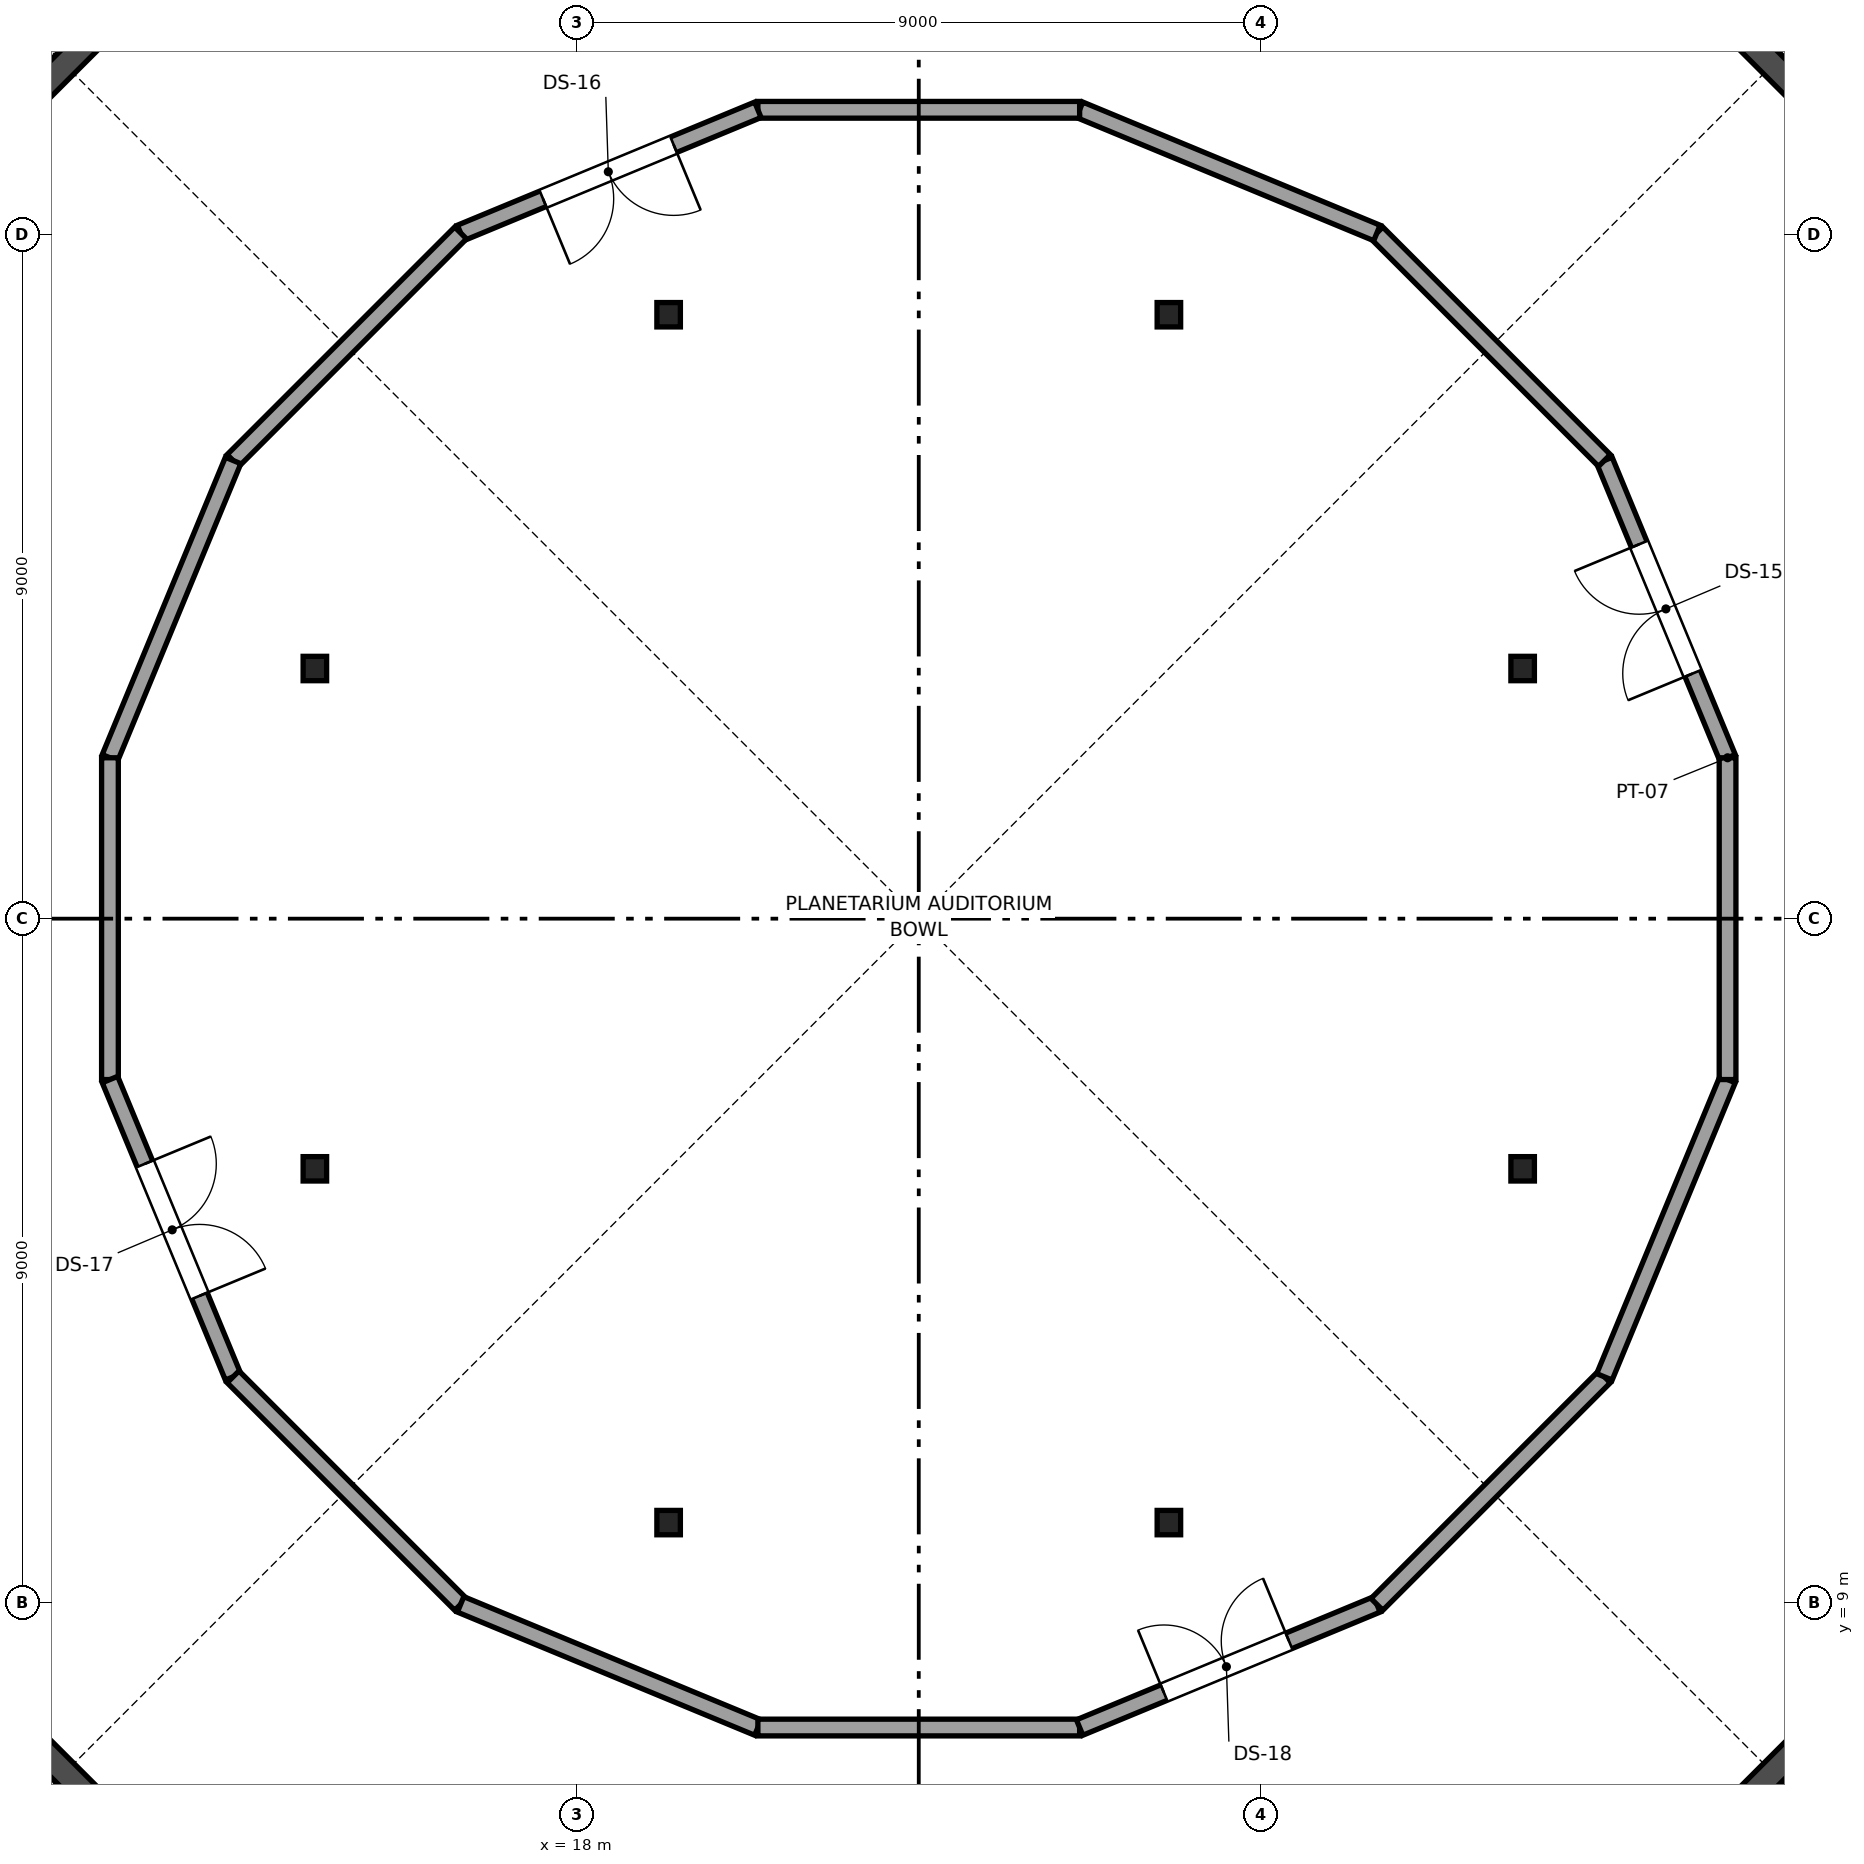
"""IFC4 building model, lengths in metres.
Left out: names, types, materials, properties, quantities, classifications, styles, units other than length and angle.
Written with IfcOpenShell. Run it as: python <this file> out.ifc"""

import sys

from ifc_helpers import new_model, si_unit, direction, frame, frame_2d, origin, origin_2d, place, context, subcontext, project, spatial, rectangle, i_section, extrude, element, fill, save


model = new_model("IFC4")
c1 = context("Model", 3, precision=1e-05, world=origin(), true_north=direction((0.0, 1.0)))
c2 = subcontext(c1, "Body", "Model", "MODEL_VIEW")
j1 = project(units=[si_unit("LENGTHUNIT", "METRE"), si_unit("PLANEANGLEUNIT", "RADIAN")], contexts=[c1])
p1 = place(None, origin())
s1 = spatial("IfcSite", under=j1, at=p1, CompositionType="ELEMENT")
p2 = place(p1, origin())
s2 = spatial("IfcBuilding", under=s1, at=p2, CompositionType="ELEMENT")
p3 = place(p2, origin())
s3 = spatial("IfcBuildingStorey", under=s2, at=p3, CompositionType="ELEMENT", Elevation=0.0)
for number, where, z_axis, x_axis in (
    (1, (30.445, 21.291, -0.24), (0.0, 0.0, 1.0), (1.0, 0.0, 0.0)),
    (2, (25.791, 25.945, -0.24), (0.0, 0.0, 1.0), (1.0, 0.0, 0.0)),
    (3, (19.209, 25.945, -0.24), (0.0, 0.0, 1.0), (1.0, 0.0, 0.0)),
    (4, (14.555, 21.291, -0.24), (0.0, 0.0, 1.0), (1.0, 0.0, 0.0)),
    (5, (14.555, 14.709, -0.24), (0.0, 0.0, 1.0), (1.0, 0.0, 0.0)),
    (6, (19.209, 10.055, -0.24), (0.0, 0.0, 1.0), (1.0, 0.0, 0.0)),
    (7, (25.791, 10.055, -0.24), (0.0, 0.0, 1.0), (1.0, 0.0, 0.0)),
    (8, (30.445, 14.709, -0.24), (0.0, 0.0, 1.0), (1.0, 0.0, 0.0)),
):
    element("IfcColumn", number, at=place(p3, frame(where, z_axis=z_axis, x_axis=x_axis)), inside=s3, PredefinedType="COLUMN", context=c2, shape_type="SweptSolid", body=[
        extrude(i_section(OverallWidth=0.309, OverallDepth=0.321, WebThickness=0.014, FlangeThickness=0.022, FilletRadius=0.017, at=origin_2d()), origin(), (0.0, 0.0, 1.0), 5.64),
    ])
for number, where, z_axis, x_axis in (
    (9, (35.97, 27.0, -0.24), (0.0, 0.0, 1.0), (-0.707, 0.707, 0.0)),
    (10, (13.5, 31.47, -0.24), (0.0, 0.0, 1.0), (-0.707, -0.707, 0.0)),
    (11, (9.03, 9.0, -0.24), (0.0, 0.0, 1.0), (0.707, -0.707, 0.0)),
    (12, (31.5, 4.53, -0.24), (0.0, 0.0, 1.0), (0.707, 0.707, 0.0)),
):
    element("IfcWall", number, at=place(p3, frame(where, z_axis=z_axis, x_axis=x_axis)), inside=s3, PredefinedType="SHEAR", context=c2, shape_type="SweptSolid", body=[
        extrude(rectangle(XDim=6.321, YDim=0.34, at=frame_2d((3.16, 0.0))), origin(), (0.0, 0.0, 1.0), 5.46),
    ])
p4 = place(p3, frame((33.142, 20.117, 0.0), z_axis=(0.0, 0.0, 1.0), x_axis=(-0.382698137168, 0.923873441445, 0.0)))
e13 = element("IfcWall", 13, at=p4, inside=s3, PredefinedType="PARTITIONING", context=c2, shape_type="SweptSolid", body=[
    extrude(rectangle(XDim=4.233, YDim=0.22, at=frame_2d((2.117, 0.0))), origin(), (0.0, 0.0, 1.0), 5.22),
])
p5 = place(p4, frame((1.2, 0.0, 0.0)))
e14 = element("IfcOpeningElement", 14, at=p5, cuts=e13, PredefinedType="OPENING", context=c2, shape_type="SweptSolid", body=[
    extrude(rectangle(XDim=1.84, YDim=2.3, at=frame_2d((0.92, 1.15))), frame((0.0, 0.12, 0.0), z_axis=(0.0, -1.0, 0.0), x_axis=(1.0, 0.0, 0.0)), (0.0, 0.0, 1.0), 0.24),
])
p6 = place(p3, frame((31.521, 24.028, 0.0), z_axis=(0.0, 0.0, 1.0), x_axis=(-0.707106781187, 0.707106781187, 0.0)))
e15 = element("IfcWall", 15, at=p6, inside=s3, PredefinedType="PARTITIONING", context=c2, shape_type="SweptSolid", body=[
    extrude(rectangle(XDim=4.234, YDim=0.22, at=frame_2d((2.117, 0.0))), origin(), (0.0, 0.0, 1.0), 5.22),
])
for number, where, z_axis, x_axis in (
    (16, (28.528, 27.021, 0.0), (0.0, 0.0, 1.0), (-0.924, 0.383, 0.0)),
    (17, (24.617, 28.642, 0.0), (0.0, 0.0, 1.0), (-1.0, 0.0, 0.0)),
):
    element("IfcWall", number, at=place(p3, frame(where, z_axis=z_axis, x_axis=x_axis)), inside=s3, PredefinedType="PARTITIONING", context=c2, shape_type="SweptSolid", body=[
        extrude(rectangle(XDim=4.233, YDim=0.22, at=frame_2d((2.117, 0.0))), origin(), (0.0, 0.0, 1.0), 5.22),
    ])
p7 = place(p3, frame((20.383, 28.642, 0.0), z_axis=(0.0, 0.0, 1.0), x_axis=(-0.923873441445, -0.382698137168, 0.0)))
e18 = element("IfcWall", 18, at=p7, inside=s3, PredefinedType="PARTITIONING", context=c2, shape_type="SweptSolid", body=[
    extrude(rectangle(XDim=4.233, YDim=0.22, at=frame_2d((2.117, 0.0))), origin(), (0.0, 0.0, 1.0), 5.22),
])
p8 = place(p7, frame((1.2, 0.0, 0.0)))
e19 = element("IfcOpeningElement", 19, at=p8, cuts=e18, PredefinedType="OPENING", context=c2, shape_type="SweptSolid", body=[
    extrude(rectangle(XDim=1.86, YDim=2.3, at=frame_2d((0.93, 1.15))), frame((0.0, 0.12, 0.0), z_axis=(0.0, -1.0, 0.0), x_axis=(1.0, 0.0, 0.0)), (0.0, 0.0, 1.0), 0.24),
])
p9 = place(p3, frame((16.472, 27.021, 0.0), z_axis=(0.0, 0.0, 1.0), x_axis=(-0.707106781187, -0.707106781187, 0.0)))
e20 = element("IfcWall", 20, at=p9, inside=s3, PredefinedType="PARTITIONING", context=c2, shape_type="SweptSolid", body=[
    extrude(rectangle(XDim=4.234, YDim=0.22, at=frame_2d((2.117, 0.0))), origin(), (0.0, 0.0, 1.0), 5.22),
])
for number, where, z_axis, x_axis in (
    (21, (13.479, 24.028, 0.0), (0.0, 0.0, 1.0), (-0.383, -0.924, 0.0)),
    (22, (11.858, 20.117, 0.0), (0.0, 0.0, 1.0), (0.0, -1.0, 0.0)),
):
    element("IfcWall", number, at=place(p3, frame(where, z_axis=z_axis, x_axis=x_axis)), inside=s3, PredefinedType="PARTITIONING", context=c2, shape_type="SweptSolid", body=[
        extrude(rectangle(XDim=4.233, YDim=0.22, at=frame_2d((2.117, 0.0))), origin(), (0.0, 0.0, 1.0), 5.22),
    ])
p10 = place(p3, frame((11.858, 15.883, 0.0), z_axis=(0.0, 0.0, 1.0), x_axis=(0.382698137168, -0.923873441445, 0.0)))
e23 = element("IfcWall", 23, at=p10, inside=s3, PredefinedType="PARTITIONING", context=c2, shape_type="SweptSolid", body=[
    extrude(rectangle(XDim=4.233, YDim=0.22, at=frame_2d((2.117, 0.0))), origin(), (0.0, 0.0, 1.0), 5.22),
])
p11 = place(p10, frame((1.2, 0.0, 0.0)))
e24 = element("IfcOpeningElement", 24, at=p11, cuts=e23, PredefinedType="OPENING", context=c2, shape_type="SweptSolid", body=[
    extrude(rectangle(XDim=1.88, YDim=2.3, at=frame_2d((0.94, 1.15))), frame((0.0, 0.12, 0.0), z_axis=(0.0, -1.0, 0.0), x_axis=(1.0, 0.0, 0.0)), (0.0, 0.0, 1.0), 0.24),
])
p12 = place(p3, frame((13.479, 11.972, 0.0), z_axis=(0.0, 0.0, 1.0), x_axis=(0.707106781187, -0.707106781187, 0.0)))
e25 = element("IfcWall", 25, at=p12, inside=s3, PredefinedType="PARTITIONING", context=c2, shape_type="SweptSolid", body=[
    extrude(rectangle(XDim=4.234, YDim=0.22, at=frame_2d((2.117, 0.0))), origin(), (0.0, 0.0, 1.0), 5.22),
])
for number, where, z_axis, x_axis in (
    (26, (16.472, 8.979, 0.0), (0.0, 0.0, 1.0), (0.924, -0.383, 0.0)),
    (27, (20.383, 7.358, 0.0), (0.0, 0.0, 1.0), (1.0, 0.0, 0.0)),
):
    element("IfcWall", number, at=place(p3, frame(where, z_axis=z_axis, x_axis=x_axis)), inside=s3, PredefinedType="PARTITIONING", context=c2, shape_type="SweptSolid", body=[
        extrude(rectangle(XDim=4.233, YDim=0.22, at=frame_2d((2.117, 0.0))), origin(), (0.0, 0.0, 1.0), 5.22),
    ])
p13 = place(p3, frame((24.617, 7.358, 0.0), z_axis=(0.0, 0.0, 1.0), x_axis=(0.923873441445, 0.382698137168, 0.0)))
e28 = element("IfcWall", 28, at=p13, inside=s3, PredefinedType="PARTITIONING", context=c2, shape_type="SweptSolid", body=[
    extrude(rectangle(XDim=4.233, YDim=0.22, at=frame_2d((2.117, 0.0))), origin(), (0.0, 0.0, 1.0), 5.22),
])
p14 = place(p13, frame((1.2, 0.0, 0.0)))
e29 = element("IfcOpeningElement", 29, at=p14, cuts=e28, PredefinedType="OPENING", context=c2, shape_type="SweptSolid", body=[
    extrude(rectangle(XDim=1.78, YDim=2.325, at=frame_2d((0.89, 1.163))), frame((0.0, 0.12, 0.0), z_axis=(0.0, -1.0, 0.0), x_axis=(1.0, 0.0, 0.0)), (0.0, 0.0, 1.0), 0.24),
])
p15 = place(p3, frame((28.528, 8.979, 0.0), z_axis=(0.0, 0.0, 1.0), x_axis=(0.707106781187, 0.707106781187, 0.0)))
e30 = element("IfcWall", 30, at=p15, inside=s3, PredefinedType="PARTITIONING", context=c2, shape_type="SweptSolid", body=[
    extrude(rectangle(XDim=4.234, YDim=0.22, at=frame_2d((2.117, 0.0))), origin(), (0.0, 0.0, 1.0), 5.22),
])
for number, where, z_axis, x_axis in (
    (31, (31.521, 11.972, 0.0), (0.0, 0.0, 1.0), (0.383, 0.924, 0.0)),
    (32, (33.142, 15.883, 0.0), (0.0, 0.0, 1.0), (0.0, 1.0, 0.0)),
):
    element("IfcWall", number, at=place(p3, frame(where, z_axis=z_axis, x_axis=x_axis)), inside=s3, PredefinedType="PARTITIONING", context=c2, shape_type="SweptSolid", body=[
        extrude(rectangle(XDim=4.233, YDim=0.22, at=frame_2d((2.117, 0.0))), origin(), (0.0, 0.0, 1.0), 5.22),
    ])
p16 = place(p5, origin())
e33 = element("IfcDoor", 33, at=p16, inside=s3, OperationType="DOUBLE_DOOR_SINGLE_SWING", PredefinedType="DOOR", context=c2, shape_type="SweptSolid", body=[
    extrude(rectangle(XDim=1.84, YDim=2.3, at=frame_2d((0.92, 1.15))), frame((0.0, 0.025, 0.0), z_axis=(0.0, -1.0, 0.0), x_axis=(1.0, 0.0, 0.0)), (0.0, 0.0, 1.0), 0.05),
])
fill(e14, e33)
p17 = place(p8, origin())
e34 = element("IfcDoor", 34, at=p17, inside=s3, OperationType="DOUBLE_DOOR_SINGLE_SWING", PredefinedType="DOOR", context=c2, shape_type="SweptSolid", body=[
    extrude(rectangle(XDim=1.86, YDim=2.3, at=frame_2d((0.93, 1.15))), frame((0.0, 0.025, 0.0), z_axis=(0.0, -1.0, 0.0), x_axis=(1.0, 0.0, 0.0)), (0.0, 0.0, 1.0), 0.05),
])
fill(e19, e34)
p18 = place(p11, origin())
e35 = element("IfcDoor", 35, at=p18, inside=s3, OperationType="DOUBLE_DOOR_SINGLE_SWING", PredefinedType="DOOR", context=c2, shape_type="SweptSolid", body=[
    extrude(rectangle(XDim=1.88, YDim=2.3, at=frame_2d((0.94, 1.15))), frame((0.0, 0.025, 0.0), z_axis=(0.0, -1.0, 0.0), x_axis=(1.0, 0.0, 0.0)), (0.0, 0.0, 1.0), 0.05),
])
fill(e24, e35)
p19 = place(p14, origin())
e36 = element("IfcDoor", 36, at=p19, inside=s3, OperationType="DOUBLE_DOOR_SINGLE_SWING", PredefinedType="DOOR", context=c2, shape_type="SweptSolid", body=[
    extrude(rectangle(XDim=1.78, YDim=2.325, at=frame_2d((0.89, 1.163))), frame((0.0, 0.025, 0.0), z_axis=(0.0, -1.0, 0.0), x_axis=(1.0, 0.0, 0.0)), (0.0, 0.0, 1.0), 0.05),
])
fill(e29, e36)
save(model, sys.argv[1])
